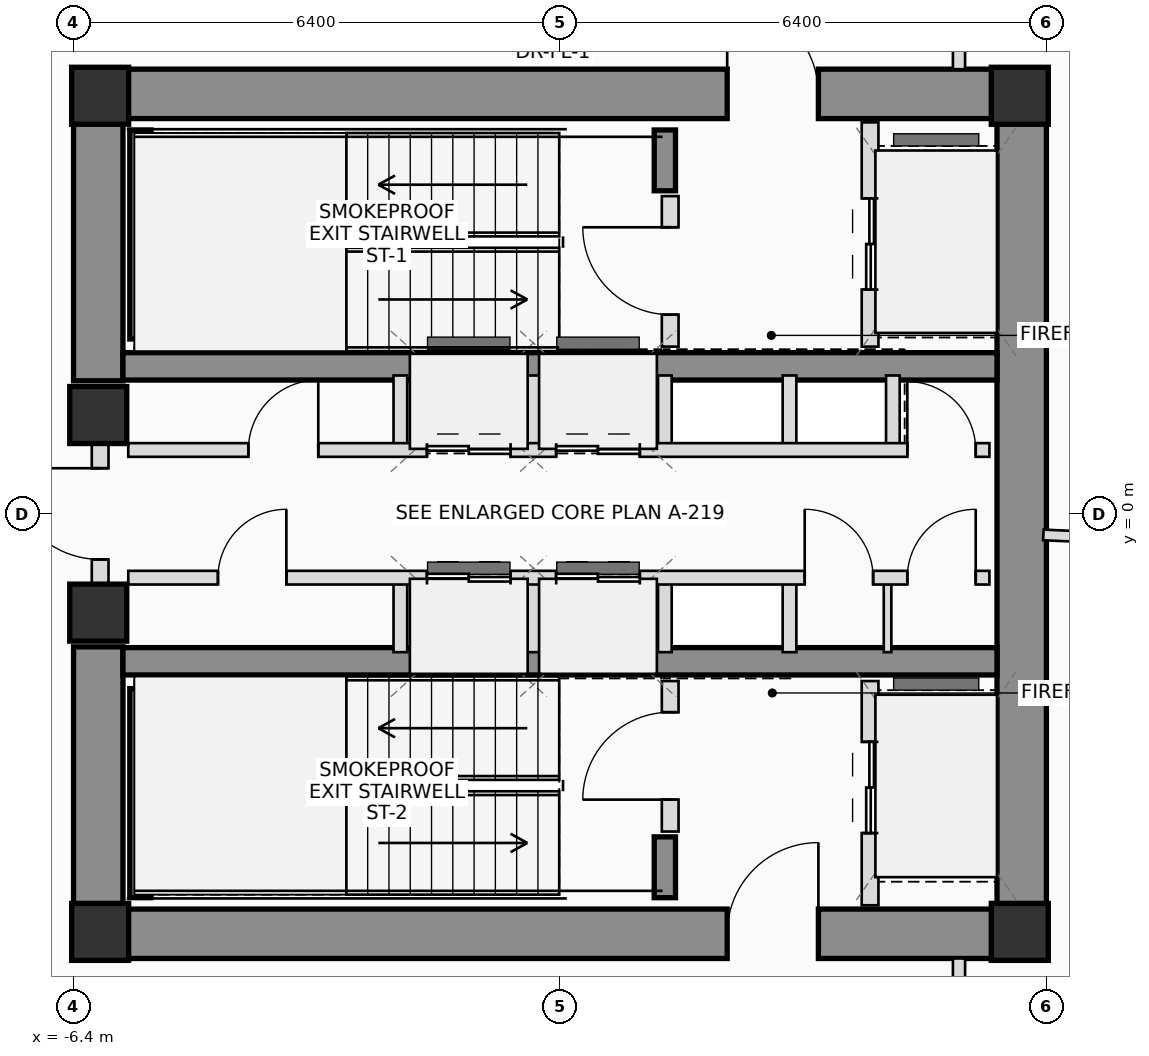
"""IFC4 building model, lengths in metres.
Left out: names, types, materials, properties, quantities, classifications, styles, units other than length and angle.
Written with IfcOpenShell. Run it as: python <this file> out.ifc"""

import sys

from ifc_helpers import new_model, si_unit, direction, frame, frame_2d, origin, origin_2d, place, context, subcontext, project, spatial, rectangle, extrude, source, transform, mapped, element, fill, save


model = new_model("IFC4")
c1 = context("Model", 3, precision=1e-05, world=origin(), true_north=direction((0.0, 1.0)))
c2 = subcontext(c1, "Body", "Model", "MODEL_VIEW")
j1 = project(units=[si_unit("LENGTHUNIT", "METRE"), si_unit("PLANEANGLEUNIT", "RADIAN")], contexts=[c1])
p1 = place(None, origin())
s1 = spatial("IfcSite", under=j1, at=p1, CompositionType="ELEMENT")
p2 = place(p1, origin())
s2 = spatial("IfcBuilding", under=s1, at=p2, CompositionType="ELEMENT")
p3 = place(p2, frame((0.0, 0.0, 215.6)))
s3 = spatial("IfcBuildingStorey", under=s2, at=p3, CompositionType="ELEMENT", Elevation=215.6)
m1 = source(origin(), c2, "Body", "SweptSolid", [
    extrude(rectangle(XDim=0.75, YDim=0.75, at=origin_2d()), origin(), (0.0, 0.0, 1.0), 3.45),
])
for number, where, z_axis, x_axis in (
    (1, (-6.05, -5.5, 0.0), (0.0, 0.0, 1.0), (1.0, 0.0, 0.0)),
    (2, (6.05, -5.5, 0.0), (0.0, 0.0, 1.0), (1.0, 0.0, 0.0)),
    (3, (6.05, 5.5, 0.0), (0.0, 0.0, 1.0), (1.0, 0.0, 0.0)),
    (4, (-6.05, 5.5, 0.0), (0.0, 0.0, 1.0), (1.0, 0.0, 0.0)),
):
    element("IfcColumn", number, at=place(p3, frame(where, z_axis=z_axis, x_axis=x_axis)), inside=s3, PredefinedType="COLUMN", context=c2, shape_type="MappedRepresentation", body=[
        mapped(m1, transform((0.0, 0.0, 0.0), scale=1.0)),
    ])
p4 = place(p3, frame((-6.4, 5.525, 0.0), z_axis=(0.0, 0.0, 1.0), x_axis=(1.0, 0.0, 0.0)))
e5 = element("IfcWall", 5, at=p4, inside=s3, PredefinedType="SHEAR", context=c2, shape_type="SweptSolid", body=[
    extrude(rectangle(XDim=12.8, YDim=0.65, at=frame_2d((6.4, 0.0))), origin(), (0.0, 0.0, 1.0), 3.45),
])
p5 = place(p4, frame((8.6, 0.0, 0.0)))
e6 = element("IfcOpeningElement", 6, at=p5, cuts=e5, PredefinedType="OPENING", context=c2, shape_type="SweptSolid", body=[
    extrude(rectangle(XDim=1.2, YDim=2.2, at=frame_2d((0.6, 1.1))), frame((0.0, 0.335, 0.0), z_axis=(0.0, -1.0, 0.0), x_axis=(1.0, 0.0, 0.0)), (0.0, 0.0, 1.0), 0.67),
])
p6 = place(p3, frame((-6.4, -5.525, 0.0), z_axis=(0.0, 0.0, 1.0), x_axis=(1.0, 0.0, 0.0)))
e7 = element("IfcWall", 7, at=p6, inside=s3, PredefinedType="SHEAR", context=c2, shape_type="SweptSolid", body=[
    extrude(rectangle(XDim=12.8, YDim=0.65, at=frame_2d((6.4, 0.0))), origin(), (0.0, 0.0, 1.0), 3.45),
])
p7 = place(p6, frame((8.6, 0.0, 0.0)))
e8 = element("IfcOpeningElement", 8, at=p7, cuts=e7, PredefinedType="OPENING", context=c2, shape_type="SweptSolid", body=[
    extrude(rectangle(XDim=1.2, YDim=2.2, at=frame_2d((0.6, 1.1))), frame((0.0, 0.335, 0.0), z_axis=(0.0, -1.0, 0.0), x_axis=(1.0, 0.0, 0.0)), (0.0, 0.0, 1.0), 0.67),
])
p8 = place(p3, frame((6.075, -5.2, 0.0), z_axis=(0.0, 0.0, 1.0), x_axis=(0.0, 1.0, 0.0)))
e9 = element("IfcWall", 9, at=p8, inside=s3, PredefinedType="SHEAR", context=c2, shape_type="SweptSolid", body=[
    extrude(rectangle(XDim=10.4, YDim=0.65, at=frame_2d((5.2, 0.0))), origin(), (0.0, 0.0, 1.0), 3.45),
])
for number, where, z_axis, x_axis in (
    (10, (-6.075, -5.2, 0.0), (0.0, 0.0, 1.0), (0.0, 1.0, 0.0)),
    (11, (-6.075, 1.75, 0.0), (0.0, 0.0, 1.0), (0.0, 1.0, 0.0)),
):
    element("IfcWall", number, at=place(p3, frame(where, z_axis=z_axis, x_axis=x_axis)), inside=s3, PredefinedType="SHEAR", context=c2, shape_type="SweptSolid", body=[
        extrude(rectangle(XDim=3.45, YDim=0.65, at=frame_2d((1.725, 0.0))), origin(), (0.0, 0.0, 1.0), 3.45),
    ])
for number, where, z_axis, x_axis in (
    (12, (-5.75, 1.94, 0.0), (0.0, 0.0, 1.0), (1.0, 0.0, 0.0)),
    (13, (-5.75, -1.94, 0.0), (0.0, 0.0, 1.0), (1.0, 0.0, 0.0)),
):
    element("IfcWall", number, at=place(p3, frame(where, z_axis=z_axis, x_axis=x_axis)), inside=s3, PredefinedType="SHEAR", context=c2, shape_type="SweptSolid", body=[
        extrude(rectangle(XDim=11.5, YDim=0.36, at=frame_2d((5.75, 0.0))), origin(), (0.0, 0.0, 1.0), 3.45),
    ])
p9 = place(p3, frame((-5.52, 2.3, 0.0), z_axis=(0.0, 0.0, 1.0), x_axis=(0.0, 1.0, 0.0)))
e14 = element("IfcWall", 14, at=p9, inside=s3, PredefinedType="SHEAR", context=c2, shape_type="SweptSolid", body=[
    extrude(rectangle(XDim=2.75, YDim=0.28, at=frame_2d((1.375, 0.0))), origin(), (0.0, 0.0, 1.0), 3.45),
])
p10 = place(p3, frame((1.38, 4.25, 0.0), z_axis=(0.0, 0.0, 1.0), x_axis=(0.0, 1.0, 0.0)))
e15 = element("IfcWall", 15, at=p10, inside=s3, PredefinedType="SHEAR", context=c2, shape_type="SweptSolid", body=[
    extrude(rectangle(XDim=0.8, YDim=0.28, at=frame_2d((0.4, 0.0))), origin(), (0.0, 0.0, 1.0), 3.45),
])
p11 = place(p3, frame((-5.52, -5.05, 0.0), z_axis=(0.0, 0.0, 1.0), x_axis=(0.0, 1.0, 0.0)))
e16 = element("IfcWall", 16, at=p11, inside=s3, PredefinedType="SHEAR", context=c2, shape_type="SweptSolid", body=[
    extrude(rectangle(XDim=2.75, YDim=0.28, at=frame_2d((1.375, 0.0))), origin(), (0.0, 0.0, 1.0), 3.45),
])
p12 = place(p3, frame((1.38, -5.05, 0.0), z_axis=(0.0, 0.0, 1.0), x_axis=(0.0, 1.0, 0.0)))
e17 = element("IfcWall", 17, at=p12, inside=s3, PredefinedType="SHEAR", context=c2, shape_type="SweptSolid", body=[
    extrude(rectangle(XDim=0.8, YDim=0.28, at=frame_2d((0.4, 0.0))), origin(), (0.0, 0.0, 1.0), 3.45),
])
for number, where, z_axis, x_axis in (
    (18, (-6.075, -1.3, 0.0), (0.0, 0.0, 1.0), (1.0, 0.0, 0.0)),
    (19, (-6.075, 1.3, 0.0), (0.0, 0.0, 1.0), (1.0, 0.0, 0.0)),
):
    element("IfcColumn", number, at=place(p3, frame(where, z_axis=z_axis, x_axis=x_axis)), inside=s3, PredefinedType="COLUMN", context=c2, shape_type="MappedRepresentation", body=[
        mapped(m1, transform((0.0, 0.0, 0.0), scale=1.0)),
    ])
p13 = place(p3, frame((-6.05, -0.95, 0.0), z_axis=(0.0, 0.0, 1.0), x_axis=(0.0, 1.0, 0.0)))
e20 = element("IfcWall", 20, at=p13, inside=s3, PredefinedType="PLUMBINGWALL", context=c2, shape_type="SweptSolid", body=[
    extrude(rectangle(XDim=1.9, YDim=0.22, at=frame_2d((0.95, 0.0))), origin(), (0.0, 0.0, 1.0), 2.19),
])
p14 = place(p13, frame((0.35, 0.0, 0.0)))
e21 = element("IfcOpeningElement", 21, at=p14, cuts=e20, PredefinedType="OPENING", context=c2, shape_type="SweptSolid", body=[
    extrude(rectangle(XDim=1.2, YDim=2.2, at=frame_2d((0.6, 1.1))), frame((0.0, 0.12, 0.0), z_axis=(0.0, -1.0, 0.0), x_axis=(1.0, 0.0, 0.0)), (0.0, 0.0, 1.0), 0.24),
])
p15 = place(p3, frame((1.45, 2.2, 0.0), z_axis=(0.0, 0.0, 1.0), x_axis=(0.0, 1.0, 0.0)))
e22 = element("IfcWall", 22, at=p15, inside=s3, PredefinedType="PLUMBINGWALL", context=c2, shape_type="SweptSolid", body=[
    extrude(rectangle(XDim=1.98, YDim=0.22, at=frame_2d((0.99, 0.0))), origin(), (0.0, 0.0, 1.0), 3.21),
])
p16 = place(p15, frame((0.42, 0.0, 0.0)))
e23 = element("IfcOpeningElement", 23, at=p16, cuts=e22, PredefinedType="OPENING", context=c2, shape_type="SweptSolid", body=[
    extrude(rectangle(XDim=1.15, YDim=2.15, at=frame_2d((0.575, 1.075))), frame((0.0, 0.12, 0.0), z_axis=(0.0, -1.0, 0.0), x_axis=(1.0, 0.0, 0.0)), (0.0, 0.0, 1.0), 0.24),
])
p17 = place(p3, frame((4.08, 2.2, 0.0), z_axis=(0.0, 0.0, 1.0), x_axis=(0.0, 1.0, 0.0)))
e24 = element("IfcWall", 24, at=p17, inside=s3, PredefinedType="PLUMBINGWALL", context=c2, shape_type="SweptSolid", body=[
    extrude(rectangle(XDim=2.95, YDim=0.22, at=frame_2d((1.475, 0.0))), origin(), (0.0, 0.0, 1.0), 3.21),
])
p18 = place(p17, frame((0.75, 0.0, 0.0)))
e25 = element("IfcOpeningElement", 25, at=p18, cuts=e24, PredefinedType="OPENING", context=c2, shape_type="SweptSolid", body=[
    extrude(rectangle(XDim=1.2, YDim=2.25, at=frame_2d((0.6, 1.125))), frame((0.0, 0.12, 0.0), z_axis=(0.0, -1.0, 0.0), x_axis=(1.0, 0.0, 0.0)), (0.0, 0.0, 1.0), 0.24),
])
p19 = place(p3, frame((1.45, -4.18, 0.0), z_axis=(0.0, 0.0, 1.0), x_axis=(0.0, 1.0, 0.0)))
e26 = element("IfcWall", 26, at=p19, inside=s3, PredefinedType="PLUMBINGWALL", context=c2, shape_type="SweptSolid", body=[
    extrude(rectangle(XDim=1.98, YDim=0.22, at=frame_2d((0.99, 0.0))), origin(), (0.0, 0.0, 1.0), 3.21),
])
p20 = place(p19, frame((0.42, 0.0, 0.0)))
e27 = element("IfcOpeningElement", 27, at=p20, cuts=e26, PredefinedType="OPENING", context=c2, shape_type="SweptSolid", body=[
    extrude(rectangle(XDim=1.15, YDim=2.15, at=frame_2d((0.575, 1.075))), frame((0.0, 0.12, 0.0), z_axis=(0.0, -1.0, 0.0), x_axis=(1.0, 0.0, 0.0)), (0.0, 0.0, 1.0), 0.24),
])
p21 = place(p3, frame((4.08, -5.15, 0.0), z_axis=(0.0, 0.0, 1.0), x_axis=(0.0, 1.0, 0.0)))
e28 = element("IfcWall", 28, at=p21, inside=s3, PredefinedType="PLUMBINGWALL", context=c2, shape_type="SweptSolid", body=[
    extrude(rectangle(XDim=2.95, YDim=0.22, at=frame_2d((1.475, 0.0))), origin(), (0.0, 0.0, 1.0), 3.21),
])
p22 = place(p21, frame((0.95, 0.0, 0.0)))
e29 = element("IfcOpeningElement", 29, at=p22, cuts=e28, PredefinedType="OPENING", context=c2, shape_type="SweptSolid", body=[
    extrude(rectangle(XDim=1.2, YDim=2.25, at=frame_2d((0.6, 1.125))), frame((0.0, 0.12, 0.0), z_axis=(0.0, -1.0, 0.0), x_axis=(1.0, 0.0, 0.0)), (0.0, 0.0, 1.0), 0.24),
])
for number, where, z_axis, x_axis in (
    (30, (-2.1, 0.84, 0.0), (0.0, 0.0, 1.0), (0.0, 1.0, 0.0)),
    (31, (-2.1, -1.82, 0.0), (0.0, 0.0, 1.0), (0.0, 1.0, 0.0)),
    (32, (-0.35, 0.84, 0.0), (0.0, 0.0, 1.0), (0.0, 1.0, 0.0)),
    (33, (-0.35, -1.82, 0.0), (0.0, 0.0, 1.0), (0.0, 1.0, 0.0)),
    (34, (1.38, 0.84, 0.0), (0.0, 0.0, 1.0), (0.0, 1.0, 0.0)),
    (35, (1.38, -1.82, 0.0), (0.0, 0.0, 1.0), (0.0, 1.0, 0.0)),
    (36, (3.02, 0.84, 0.0), (0.0, 0.0, 1.0), (0.0, 1.0, 0.0)),
    (37, (4.38, 0.84, 0.0), (0.0, 0.0, 1.0), (0.0, 1.0, 0.0)),
    (38, (3.02, -1.82, 0.0), (0.0, 0.0, 1.0), (0.0, 1.0, 0.0)),
):
    element("IfcWall", number, at=place(p3, frame(where, z_axis=z_axis, x_axis=x_axis)), inside=s3, PredefinedType="PLUMBINGWALL", context=c2, shape_type="SweptSolid", body=[
        extrude(rectangle(XDim=0.98, YDim=0.18, at=frame_2d((0.49, 0.0))), origin(), (0.0, 0.0, 1.0), 3.21),
    ])
p23 = place(p3, frame((4.31, -1.82, 0.0), z_axis=(0.0, 0.0, 1.0), x_axis=(0.0, 1.0, 0.0)))
e39 = element("IfcWall", 39, at=p23, inside=s3, PredefinedType="PARTITIONING", context=c2, shape_type="SweptSolid", body=[
    extrude(rectangle(XDim=0.98, YDim=0.1, at=frame_2d((0.49, 0.0))), origin(), (0.0, 0.0, 1.0), 3.21),
])
p24 = place(p3, frame((-5.68, 0.84, 0.0), z_axis=(0.0, 0.0, 1.0), x_axis=(1.0, 0.0, 0.0)))
e40 = element("IfcWall", 40, at=p24, inside=s3, PredefinedType="PLUMBINGWALL", context=c2, shape_type="SweptSolid", body=[
    extrude(rectangle(XDim=11.33, YDim=0.18, at=frame_2d((5.665, 0.0))), origin(), (0.0, 0.0, 1.0), 3.21),
])
p25 = place(p24, frame((1.58, 0.0, 0.0)))
e41 = element("IfcOpeningElement", 41, at=p25, cuts=e40, PredefinedType="OPENING", context=c2, shape_type="SweptSolid", body=[
    extrude(rectangle(XDim=0.92, YDim=2.1, at=frame_2d((0.46, 1.05))), frame((0.0, 0.1, 0.0), z_axis=(0.0, -1.0, 0.0), x_axis=(1.0, 0.0, 0.0)), (0.0, 0.0, 1.0), 0.2),
])
p26 = place(p24, frame((3.93, 0.0, 0.0)))
e42 = element("IfcOpeningElement", 42, at=p26, cuts=e40, PredefinedType="OPENING", context=c2, shape_type="SweptSolid", body=[
    extrude(rectangle(XDim=1.1, YDim=2.2, at=frame_2d((0.55, 1.1))), frame((0.0, 0.1, 0.0), z_axis=(0.0, -1.0, 0.0), x_axis=(1.0, 0.0, 0.0)), (0.0, 0.0, 1.0), 0.2),
])
p27 = place(p24, frame((5.63, 0.0, 0.0)))
e43 = element("IfcOpeningElement", 43, at=p27, cuts=e40, PredefinedType="OPENING", context=c2, shape_type="SweptSolid", body=[
    extrude(rectangle(XDim=1.1, YDim=2.2, at=frame_2d((0.55, 1.1))), frame((0.0, 0.1, 0.0), z_axis=(0.0, -1.0, 0.0), x_axis=(1.0, 0.0, 0.0)), (0.0, 0.0, 1.0), 0.2),
])
p28 = place(p24, frame((10.25, 0.0, 0.0)))
e44 = element("IfcOpeningElement", 44, at=p28, cuts=e40, PredefinedType="OPENING", context=c2, shape_type="SweptSolid", body=[
    extrude(rectangle(XDim=0.9, YDim=2.05, at=frame_2d((0.45, 1.025))), frame((0.0, 0.1, 0.0), z_axis=(0.0, -1.0, 0.0), x_axis=(1.0, 0.0, 0.0)), (0.0, 0.0, 1.0), 0.2),
])
p29 = place(p3, frame((-5.68, -0.84, 0.0), z_axis=(0.0, 0.0, 1.0), x_axis=(1.0, 0.0, 0.0)))
e45 = element("IfcWall", 45, at=p29, inside=s3, PredefinedType="PLUMBINGWALL", context=c2, shape_type="SweptSolid", body=[
    extrude(rectangle(XDim=11.33, YDim=0.18, at=frame_2d((5.665, 0.0))), origin(), (0.0, 0.0, 1.0), 3.21),
])
p30 = place(p29, frame((1.18, 0.0, 0.0)))
e46 = element("IfcOpeningElement", 46, at=p30, cuts=e45, PredefinedType="OPENING", context=c2, shape_type="SweptSolid", body=[
    extrude(rectangle(XDim=0.9, YDim=2.05, at=frame_2d((0.45, 1.025))), frame((0.0, 0.1, 0.0), z_axis=(0.0, -1.0, 0.0), x_axis=(1.0, 0.0, 0.0)), (0.0, 0.0, 1.0), 0.2),
])
p31 = place(p29, frame((3.93, 0.0, 0.0)))
e47 = element("IfcOpeningElement", 47, at=p31, cuts=e45, PredefinedType="OPENING", context=c2, shape_type="SweptSolid", body=[
    extrude(rectangle(XDim=1.1, YDim=2.2, at=frame_2d((0.55, 1.1))), frame((0.0, 0.1, 0.0), z_axis=(0.0, -1.0, 0.0), x_axis=(1.0, 0.0, 0.0)), (0.0, 0.0, 1.0), 0.2),
])
p32 = place(p29, frame((5.63, 0.0, 0.0)))
e48 = element("IfcOpeningElement", 48, at=p32, cuts=e45, PredefinedType="OPENING", context=c2, shape_type="SweptSolid", body=[
    extrude(rectangle(XDim=1.1, YDim=2.2, at=frame_2d((0.55, 1.1))), frame((0.0, 0.1, 0.0), z_axis=(0.0, -1.0, 0.0), x_axis=(1.0, 0.0, 0.0)), (0.0, 0.0, 1.0), 0.2),
])
p33 = place(p29, frame((8.9, 0.0, 0.0)))
e49 = element("IfcOpeningElement", 49, at=p33, cuts=e45, PredefinedType="OPENING", context=c2, shape_type="SweptSolid", body=[
    extrude(rectangle(XDim=0.9, YDim=2.05, at=frame_2d((0.45, 1.025))), frame((0.0, 0.1, 0.0), z_axis=(0.0, -1.0, 0.0), x_axis=(1.0, 0.0, 0.0)), (0.0, 0.0, 1.0), 0.2),
])
p34 = place(p29, frame((10.25, 0.0, 0.0)))
e50 = element("IfcOpeningElement", 50, at=p34, cuts=e45, PredefinedType="OPENING", context=c2, shape_type="SweptSolid", body=[
    extrude(rectangle(XDim=0.9, YDim=2.05, at=frame_2d((0.45, 1.025))), frame((0.0, 0.1, 0.0), z_axis=(0.0, -1.0, 0.0), x_axis=(1.0, 0.0, 0.0)), (0.0, 0.0, 1.0), 0.2),
])
p35 = place(p3, frame((5.25, 7.6, 0.0), z_axis=(0.0, 0.0, 1.0), x_axis=(0.0, -1.0, 0.0)))
e51 = element("IfcWall", 51, at=p35, inside=s3, PredefinedType="PARTITIONING", context=c2, shape_type="SweptSolid", body=[
    extrude(rectangle(XDim=1.75, YDim=0.16, at=frame_2d((0.875, 0.0))), origin(), (0.0, 0.0, 1.0), 2.565),
])
p36 = place(p3, frame((5.25, -5.85, 0.0), z_axis=(0.0, 0.0, 1.0), x_axis=(0.0, -1.0, 0.0)))
e52 = element("IfcWall", 52, at=p36, inside=s3, PredefinedType="PARTITIONING", context=c2, shape_type="SweptSolid", body=[
    extrude(rectangle(XDim=1.75, YDim=0.16, at=frame_2d((0.875, 0.0))), origin(), (0.0, 0.0, 1.0), 3.21),
])
p37 = place(p3, frame((6.36, -0.278, 0.0), z_axis=(0.0, 0.0, 1.0), x_axis=(0.999047276506, -0.04364102778, 0.0)))
e53 = element("IfcWall", 53, at=p37, inside=s3, PredefinedType="PARTITIONING", context=c2, shape_type="SweptSolid", body=[
    extrude(rectangle(XDim=7.642, YDim=0.14, at=frame_2d((3.821, 0.0))), origin(), (0.0, 0.0, 1.0), 2.565),
])
p38 = place(p5, origin())
e54 = element("IfcDoor", 54, at=p38, inside=s3, OperationType="SINGLE_SWING_LEFT", PredefinedType="DOOR", context=c2, shape_type="SweptSolid", body=[
    extrude(rectangle(XDim=1.2, YDim=2.2, at=frame_2d((0.6, 1.1))), frame((0.0, 0.025, 0.0), z_axis=(0.0, -1.0, 0.0), x_axis=(1.0, 0.0, 0.0)), (0.0, 0.0, 1.0), 0.05),
])
fill(e6, e54)
p39 = place(p7, origin())
e55 = element("IfcDoor", 55, at=p39, inside=s3, OperationType="SINGLE_SWING_RIGHT", PredefinedType="DOOR", context=c2, shape_type="SweptSolid", body=[
    extrude(rectangle(XDim=1.2, YDim=2.2, at=frame_2d((0.6, 1.1))), frame((0.0, 0.025, 0.0), z_axis=(0.0, -1.0, 0.0), x_axis=(1.0, 0.0, 0.0)), (0.0, 0.0, 1.0), 0.05),
])
fill(e8, e55)
p40 = place(p14, origin())
e56 = element("IfcDoor", 56, at=p40, inside=s3, OperationType="SINGLE_SWING_RIGHT", PredefinedType="DOOR", context=c2, shape_type="SweptSolid", body=[
    extrude(rectangle(XDim=1.2, YDim=2.2, at=frame_2d((0.6, 1.1))), frame((0.0, 0.025, 0.0), z_axis=(0.0, -1.0, 0.0), x_axis=(1.0, 0.0, 0.0)), (0.0, 0.0, 1.0), 0.05),
])
fill(e21, e56)
p41 = place(p16, origin())
e57 = element("IfcDoor", 57, at=p41, inside=s3, OperationType="SINGLE_SWING_RIGHT", PredefinedType="DOOR", context=c2, shape_type="SweptSolid", body=[
    extrude(rectangle(XDim=1.15, YDim=2.15, at=frame_2d((0.575, 1.075))), frame((0.0, 0.025, 0.0), z_axis=(0.0, -1.0, 0.0), x_axis=(1.0, 0.0, 0.0)), (0.0, 0.0, 1.0), 0.05),
])
fill(e23, e57)
p42 = place(p18, origin())
e58 = element("IfcDoor", 58, at=p42, inside=s3, OperationType="DOUBLE_DOOR_SLIDING", PredefinedType="DOOR", context=c2, shape_type="SweptSolid", body=[
    extrude(rectangle(XDim=1.2, YDim=2.25, at=frame_2d((0.6, 1.125))), frame((0.0, 0.025, 0.0), z_axis=(0.0, -1.0, 0.0), x_axis=(1.0, 0.0, 0.0)), (0.0, 0.0, 1.0), 0.05),
])
fill(e25, e58)
p43 = place(p20, origin())
e59 = element("IfcDoor", 59, at=p43, inside=s3, OperationType="SINGLE_SWING_LEFT", PredefinedType="DOOR", context=c2, shape_type="SweptSolid", body=[
    extrude(rectangle(XDim=1.15, YDim=2.15, at=frame_2d((0.575, 1.075))), frame((0.0, 0.025, 0.0), z_axis=(0.0, -1.0, 0.0), x_axis=(1.0, 0.0, 0.0)), (0.0, 0.0, 1.0), 0.05),
])
fill(e27, e59)
p44 = place(p22, origin())
e60 = element("IfcDoor", 60, at=p44, inside=s3, OperationType="DOUBLE_DOOR_SLIDING", PredefinedType="DOOR", context=c2, shape_type="SweptSolid", body=[
    extrude(rectangle(XDim=1.2, YDim=2.25, at=frame_2d((0.6, 1.125))), frame((0.0, 0.025, 0.0), z_axis=(0.0, -1.0, 0.0), x_axis=(1.0, 0.0, 0.0)), (0.0, 0.0, 1.0), 0.05),
])
fill(e29, e60)
p45 = place(p25, origin())
e61 = element("IfcDoor", 61, at=p45, inside=s3, OperationType="SINGLE_SWING_RIGHT", PredefinedType="DOOR", context=c2, shape_type="SweptSolid", body=[
    extrude(rectangle(XDim=0.92, YDim=2.1, at=frame_2d((0.46, 1.05))), frame((0.0, 0.025, 0.0), z_axis=(0.0, -1.0, 0.0), x_axis=(1.0, 0.0, 0.0)), (0.0, 0.0, 1.0), 0.05),
])
fill(e41, e61)
p46 = place(p26, origin())
e62 = element("IfcDoor", 62, at=p46, inside=s3, OperationType="DOUBLE_DOOR_SLIDING", PredefinedType="DOOR", context=c2, shape_type="SweptSolid", body=[
    extrude(rectangle(XDim=1.1, YDim=2.2, at=frame_2d((0.55, 1.1))), frame((0.0, 0.025, 0.0), z_axis=(0.0, -1.0, 0.0), x_axis=(1.0, 0.0, 0.0)), (0.0, 0.0, 1.0), 0.05),
])
fill(e42, e62)
p47 = place(p27, origin())
e63 = element("IfcDoor", 63, at=p47, inside=s3, OperationType="DOUBLE_DOOR_SLIDING", PredefinedType="DOOR", context=c2, shape_type="SweptSolid", body=[
    extrude(rectangle(XDim=1.1, YDim=2.2, at=frame_2d((0.55, 1.1))), frame((0.0, 0.025, 0.0), z_axis=(0.0, -1.0, 0.0), x_axis=(1.0, 0.0, 0.0)), (0.0, 0.0, 1.0), 0.05),
])
fill(e43, e63)
p48 = place(p28, origin())
e64 = element("IfcDoor", 64, at=p48, inside=s3, OperationType="SINGLE_SWING_LEFT", PredefinedType="DOOR", context=c2, shape_type="SweptSolid", body=[
    extrude(rectangle(XDim=0.9, YDim=2.05, at=frame_2d((0.45, 1.025))), frame((0.0, 0.025, 0.0), z_axis=(0.0, -1.0, 0.0), x_axis=(1.0, 0.0, 0.0)), (0.0, 0.0, 1.0), 0.05),
])
fill(e44, e64)
p49 = place(p30, origin())
e65 = element("IfcDoor", 65, at=p49, inside=s3, OperationType="SINGLE_SWING_RIGHT", PredefinedType="DOOR", context=c2, shape_type="SweptSolid", body=[
    extrude(rectangle(XDim=0.9, YDim=2.05, at=frame_2d((0.45, 1.025))), frame((0.0, 0.025, 0.0), z_axis=(0.0, -1.0, 0.0), x_axis=(1.0, 0.0, 0.0)), (0.0, 0.0, 1.0), 0.05),
])
fill(e46, e65)
p50 = place(p31, origin())
e66 = element("IfcDoor", 66, at=p50, inside=s3, OperationType="DOUBLE_DOOR_SLIDING", PredefinedType="DOOR", context=c2, shape_type="SweptSolid", body=[
    extrude(rectangle(XDim=1.1, YDim=2.2, at=frame_2d((0.55, 1.1))), frame((0.0, 0.025, 0.0), z_axis=(0.0, -1.0, 0.0), x_axis=(1.0, 0.0, 0.0)), (0.0, 0.0, 1.0), 0.05),
])
fill(e47, e66)
p51 = place(p32, origin())
e67 = element("IfcDoor", 67, at=p51, inside=s3, OperationType="DOUBLE_DOOR_SLIDING", PredefinedType="DOOR", context=c2, shape_type="SweptSolid", body=[
    extrude(rectangle(XDim=1.1, YDim=2.2, at=frame_2d((0.55, 1.1))), frame((0.0, 0.025, 0.0), z_axis=(0.0, -1.0, 0.0), x_axis=(1.0, 0.0, 0.0)), (0.0, 0.0, 1.0), 0.05),
])
fill(e48, e67)
p52 = place(p33, origin())
e68 = element("IfcDoor", 68, at=p52, inside=s3, OperationType="SINGLE_SWING_LEFT", PredefinedType="DOOR", context=c2, shape_type="SweptSolid", body=[
    extrude(rectangle(XDim=0.9, YDim=2.05, at=frame_2d((0.45, 1.025))), frame((0.0, 0.025, 0.0), z_axis=(0.0, -1.0, 0.0), x_axis=(1.0, 0.0, 0.0)), (0.0, 0.0, 1.0), 0.05),
])
fill(e49, e68)
p53 = place(p34, origin())
e69 = element("IfcDoor", 69, at=p53, inside=s3, OperationType="SINGLE_SWING_RIGHT", PredefinedType="DOOR", context=c2, shape_type="SweptSolid", body=[
    extrude(rectangle(XDim=0.9, YDim=2.05, at=frame_2d((0.45, 1.025))), frame((0.0, 0.025, 0.0), z_axis=(0.0, -1.0, 0.0), x_axis=(1.0, 0.0, 0.0)), (0.0, 0.0, 1.0), 0.05),
])
fill(e50, e69)
save(model, sys.argv[1])
